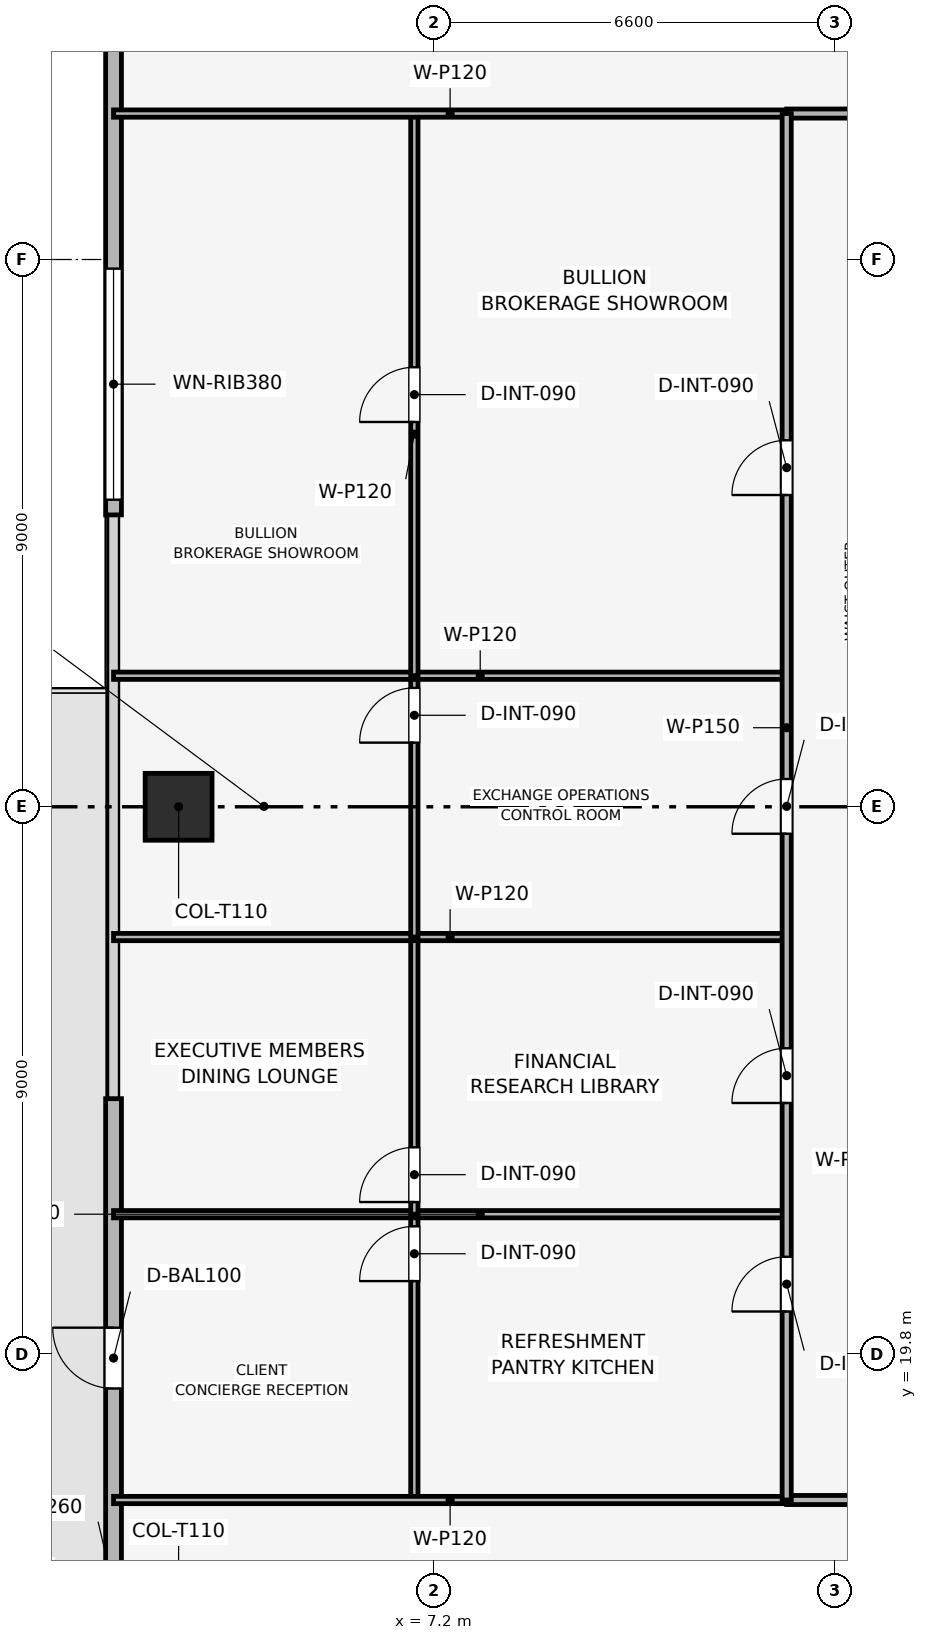
"""IFC4 building model, lengths in metres.
Left out: names, types, materials, properties, quantities, classifications, styles, units other than length and angle.
Written with IfcOpenShell. Run it as: python <this file> out.ifc"""

import sys

from ifc_helpers import new_model, si_unit, direction, frame, frame_2d, origin, origin_2d, place, context, subcontext, project, spatial, rectangle, extrude, element, fill, save


model = new_model("IFC4")
c1 = context("Model", 3, precision=1e-05, world=origin(), true_north=direction((0.0, 1.0)))
c2 = subcontext(c1, "Body", "Model", "MODEL_VIEW")
j1 = project(units=[si_unit("LENGTHUNIT", "METRE"), si_unit("PLANEANGLEUNIT", "RADIAN")], contexts=[c1])
p1 = place(None, origin())
s1 = spatial("IfcSite", under=j1, at=p1, CompositionType="ELEMENT")
p2 = place(p1, origin())
s2 = spatial("IfcBuilding", under=s1, at=p2, CompositionType="ELEMENT")
p3 = place(p2, frame((0.0, 0.0, 214.95)))
s3 = spatial("IfcBuildingStorey", under=s2, at=p3, CompositionType="ELEMENT", Elevation=214.95)
p4 = place(p3, frame((3.0, 28.8, 0.003), z_axis=(0.0, 0.0, 1.0), x_axis=(1.0, 0.0, 0.0)))
e1 = element("IfcColumn", 1, at=p4, inside=s3, PredefinedType="COLUMN", context=c2, shape_type="SweptSolid", body=[
    extrude(rectangle(XDim=1.1, YDim=1.1, at=origin_2d()), origin(), (0.0, 0.0, 1.0), 3.494),
])
p5 = place(p3, frame((1.93, 9.3, 0.0), z_axis=(0.0, 0.0, 1.0), x_axis=(0.0, 1.0, 0.0)))
e2 = element("IfcWall", 2, at=p5, inside=s3, PredefinedType="SOLIDWALL", context=c2, shape_type="SweptSolid", body=[
    extrude(rectangle(XDim=14.7, YDim=0.26, at=frame_2d((7.35, 0.0))), origin(), (0.0, 0.0, 1.0), 3.5),
])
p6 = place(p5, frame((9.934, 0.0, 0.0)))
e3 = element("IfcOpeningElement", 3, at=p6, cuts=e2, PredefinedType="OPENING", context=c2, shape_type="SweptSolid", body=[
    extrude(rectangle(XDim=1.0, YDim=2.2, at=frame_2d((0.5, 1.1))), frame((0.0, 0.14, 0.0), z_axis=(0.0, -1.0, 0.0), x_axis=(1.0, 0.0, 0.0)), (0.0, 0.0, 1.0), 0.28),
])
p7 = place(p3, frame((1.93, 33.6, 0.0), z_axis=(0.0, 0.0, 1.0), x_axis=(0.0, 1.0, 0.0)))
e4 = element("IfcWall", 4, at=p7, inside=s3, PredefinedType="SOLIDWALL", context=c2, shape_type="SweptSolid", body=[
    extrude(rectangle(XDim=14.7, YDim=0.26, at=frame_2d((7.35, 0.0))), origin(), (0.0, 0.0, 1.0), 3.5),
])
p8 = place(p7, frame((0.25, 0.0, 0.9)))
e5 = element("IfcOpeningElement", 5, at=p8, cuts=e4, PredefinedType="OPENING", context=c2, shape_type="SweptSolid", body=[
    extrude(rectangle(XDim=3.8, YDim=1.9, at=frame_2d((1.9, 0.95))), frame((0.0, 0.14, 0.0), z_axis=(0.0, -1.0, 0.0), x_axis=(1.0, 0.0, 0.0)), (0.0, 0.0, 1.0), 0.28),
])
p9 = place(p3, frame((6.877, 17.4, 0.0), z_axis=(0.0, 0.0, 1.0), x_axis=(0.0, 1.0, 0.0)))
e6 = element("IfcWall", 6, at=p9, inside=s3, PredefinedType="PARTITIONING", context=c2, shape_type="SweptSolid", body=[
    extrude(rectangle(XDim=4.7, YDim=0.12, at=frame_2d((2.35, 0.0))), origin(), (0.0, 0.0, 1.0), 3.035),
])
p10 = place(p9, frame((3.6, 0.0, 0.0)))
e7 = element("IfcOpeningElement", 7, at=p10, cuts=e6, PredefinedType="OPENING", context=c2, shape_type="SweptSolid", body=[
    extrude(rectangle(XDim=0.9, YDim=2.1, at=frame_2d((0.45, 1.05))), frame((0.0, 0.07, 0.0), z_axis=(0.0, -1.0, 0.0), x_axis=(1.0, 0.0, 0.0)), (0.0, 0.0, 1.0), 0.14),
])
p11 = place(p3, frame((1.93, 22.1, 0.0), z_axis=(0.0, 0.0, 1.0), x_axis=(1.0, 0.0, 0.0)))
e8 = element("IfcWall", 8, at=p11, inside=s3, PredefinedType="PARTITIONING", context=c2, shape_type="SweptSolid", body=[
    extrude(rectangle(XDim=11.07, YDim=0.12, at=frame_2d((5.535, 0.0))), origin(), (0.0, 0.0, 1.0), 2.885),
])
p12 = place(p3, frame((6.877, 22.1, 0.0), z_axis=(0.0, 0.0, 1.0), x_axis=(0.0, 1.0, 0.0)))
e9 = element("IfcWall", 9, at=p12, inside=s3, PredefinedType="PARTITIONING", context=c2, shape_type="SweptSolid", body=[
    extrude(rectangle(XDim=4.558, YDim=0.12, at=frame_2d((2.279, 0.0))), origin(), (0.0, 0.0, 1.0), 3.5),
])
p13 = place(p12, frame((0.2, 0.0, 0.0)))
e10 = element("IfcOpeningElement", 10, at=p13, cuts=e9, PredefinedType="OPENING", context=c2, shape_type="SweptSolid", body=[
    extrude(rectangle(XDim=0.9, YDim=2.1, at=frame_2d((0.45, 1.05))), frame((0.0, 0.07, 0.0), z_axis=(0.0, -1.0, 0.0), x_axis=(1.0, 0.0, 0.0)), (0.0, 0.0, 1.0), 0.14),
])
p14 = place(p3, frame((1.93, 26.658, 0.0), z_axis=(0.0, 0.0, 1.0), x_axis=(1.0, 0.0, 0.0)))
e11 = element("IfcWall", 11, at=p14, inside=s3, PredefinedType="PARTITIONING", context=c2, shape_type="SweptSolid", body=[
    extrude(rectangle(XDim=11.07, YDim=0.12, at=frame_2d((5.535, 0.0))), origin(), (0.0, 0.0, 1.0), 2.885),
])
p15 = place(p3, frame((6.877, 26.658, 0.0), z_axis=(0.0, 0.0, 1.0), x_axis=(0.0, 1.0, 0.0)))
e12 = element("IfcWall", 12, at=p15, inside=s3, PredefinedType="PARTITIONING", context=c2, shape_type="SweptSolid", body=[
    extrude(rectangle(XDim=4.297, YDim=0.12, at=frame_2d((2.148, 0.0))), origin(), (0.0, 0.0, 1.0), 3.035),
])
p16 = place(p15, frame((3.197, 0.0, 0.0)))
e13 = element("IfcOpeningElement", 13, at=p16, cuts=e12, PredefinedType="OPENING", context=c2, shape_type="SweptSolid", body=[
    extrude(rectangle(XDim=0.9, YDim=2.1, at=frame_2d((0.45, 1.05))), frame((0.0, 0.07, 0.0), z_axis=(0.0, -1.0, 0.0), x_axis=(1.0, 0.0, 0.0)), (0.0, 0.0, 1.0), 0.14),
])
p17 = place(p3, frame((1.93, 30.955, 0.0), z_axis=(0.0, 0.0, 1.0), x_axis=(1.0, 0.0, 0.0)))
e14 = element("IfcWall", 14, at=p17, inside=s3, PredefinedType="PARTITIONING", context=c2, shape_type="SweptSolid", body=[
    extrude(rectangle(XDim=11.07, YDim=0.12, at=frame_2d((5.535, 0.0))), origin(), (0.0, 0.0, 1.0), 2.885),
])
p18 = place(p3, frame((6.877, 30.955, 0.0), z_axis=(0.0, 0.0, 1.0), x_axis=(0.0, 1.0, 0.0)))
e15 = element("IfcWall", 15, at=p18, inside=s3, PredefinedType="PARTITIONING", context=c2, shape_type="SweptSolid", body=[
    extrude(rectangle(XDim=9.245, YDim=0.12, at=frame_2d((4.623, 0.0))), origin(), (0.0, 0.0, 1.0), 3.035),
])
p19 = place(p18, frame((4.173, 0.0, 0.0)))
e16 = element("IfcOpeningElement", 16, at=p19, cuts=e15, PredefinedType="OPENING", context=c2, shape_type="SweptSolid", body=[
    extrude(rectangle(XDim=0.9, YDim=2.1, at=frame_2d((0.45, 1.05))), frame((0.0, 0.07, 0.0), z_axis=(0.0, -1.0, 0.0), x_axis=(1.0, 0.0, 0.0)), (0.0, 0.0, 1.0), 0.14),
])
for number, where, z_axis, x_axis in (
    (17, (1.93, 17.4, 0.0), (0.0, 0.0, 1.0), (1.0, 0.0, 0.0)),
    (18, (1.93, 40.2, 0.0), (0.0, 0.0, 1.0), (1.0, 0.0, 0.0)),
):
    element("IfcWall", number, at=place(p3, frame(where, z_axis=z_axis, x_axis=x_axis)), inside=s3, PredefinedType="PARTITIONING", context=c2, shape_type="SweptSolid", body=[
        extrude(rectangle(XDim=11.07, YDim=0.12, at=frame_2d((5.535, 0.0))), origin(), (0.0, 0.0, 1.0), 2.885),
    ])
p20 = place(p3, frame((13.0, 17.4, 0.0), z_axis=(0.0, 0.0, 1.0), x_axis=(1.0, 0.0, 0.0)))
e19 = element("IfcWall", 19, at=p20, inside=s3, PredefinedType="PARTITIONING", context=c2, shape_type="SweptSolid", body=[
    extrude(rectangle(XDim=31.6, YDim=0.15, at=frame_2d((15.8, 0.0))), origin(), (0.0, 0.0, 1.0), 3.035),
])
p21 = place(p20, frame((3.805, 0.0, 0.0)))
e20 = element("IfcOpeningElement", 20, at=p21, cuts=e19, PredefinedType="OPENING", context=c2, shape_type="SweptSolid", body=[
    extrude(rectangle(XDim=0.9, YDim=2.1, at=frame_2d((0.45, 1.05))), frame((0.0, 0.085, 0.0), z_axis=(0.0, -1.0, 0.0), x_axis=(1.0, 0.0, 0.0)), (0.0, 0.0, 1.0), 0.17),
])
p22 = place(p20, frame((19.605, 0.0, 0.0)))
e21 = element("IfcOpeningElement", 21, at=p22, cuts=e19, PredefinedType="OPENING", context=c2, shape_type="SweptSolid", body=[
    extrude(rectangle(XDim=0.9, YDim=2.1, at=frame_2d((0.45, 1.05))), frame((0.0, 0.085, 0.0), z_axis=(0.0, -1.0, 0.0), x_axis=(1.0, 0.0, 0.0)), (0.0, 0.0, 1.0), 0.17),
])
p23 = place(p3, frame((13.0, 40.2, 0.0), z_axis=(0.0, 0.0, 1.0), x_axis=(1.0, 0.0, 0.0)))
e22 = element("IfcWall", 22, at=p23, inside=s3, PredefinedType="PARTITIONING", context=c2, shape_type="SweptSolid", body=[
    extrude(rectangle(XDim=31.6, YDim=0.15, at=frame_2d((15.8, 0.0))), origin(), (0.0, 0.0, 1.0), 3.035),
])
p24 = place(p23, frame((15.35, 0.0, 0.0)))
e23 = element("IfcOpeningElement", 23, at=p24, cuts=e22, PredefinedType="OPENING", context=c2, shape_type="SweptSolid", body=[
    extrude(rectangle(XDim=0.9, YDim=2.1, at=frame_2d((0.45, 1.05))), frame((0.0, 0.085, 0.0), z_axis=(0.0, -1.0, 0.0), x_axis=(1.0, 0.0, 0.0)), (0.0, 0.0, 1.0), 0.17),
])
p25 = place(p3, frame((13.0, 17.4, 0.0), z_axis=(0.0, 0.0, 1.0), x_axis=(0.0, 1.0, 0.0)))
e24 = element("IfcWall", 24, at=p25, inside=s3, PredefinedType="PARTITIONING", context=c2, shape_type="SweptSolid", body=[
    extrude(rectangle(XDim=22.8, YDim=0.15, at=frame_2d((11.4, 0.0))), origin(), (0.0, 0.0, 1.0), 3.035),
])
p26 = place(p25, frame((3.1, 0.0, 0.0)))
e25 = element("IfcOpeningElement", 25, at=p26, cuts=e24, PredefinedType="OPENING", context=c2, shape_type="SweptSolid", body=[
    extrude(rectangle(XDim=0.9, YDim=2.1, at=frame_2d((0.45, 1.05))), frame((0.0, 0.085, 0.0), z_axis=(0.0, -1.0, 0.0), x_axis=(1.0, 0.0, 0.0)), (0.0, 0.0, 1.0), 0.17),
])
p27 = place(p25, frame((6.529, 0.0, 0.0)))
e26 = element("IfcOpeningElement", 26, at=p27, cuts=e24, PredefinedType="OPENING", context=c2, shape_type="SweptSolid", body=[
    extrude(rectangle(XDim=0.9, YDim=2.1, at=frame_2d((0.45, 1.05))), frame((0.0, 0.085, 0.0), z_axis=(0.0, -1.0, 0.0), x_axis=(1.0, 0.0, 0.0)), (0.0, 0.0, 1.0), 0.17),
])
p28 = place(p25, frame((10.957, 0.0, 0.0)))
e27 = element("IfcOpeningElement", 27, at=p28, cuts=e24, PredefinedType="OPENING", context=c2, shape_type="SweptSolid", body=[
    extrude(rectangle(XDim=0.9, YDim=2.1, at=frame_2d((0.45, 1.05))), frame((0.0, 0.085, 0.0), z_axis=(0.0, -1.0, 0.0), x_axis=(1.0, 0.0, 0.0)), (0.0, 0.0, 1.0), 0.17),
])
p29 = place(p25, frame((16.527, 0.0, 0.0)))
e28 = element("IfcOpeningElement", 28, at=p29, cuts=e24, PredefinedType="OPENING", context=c2, shape_type="SweptSolid", body=[
    extrude(rectangle(XDim=0.9, YDim=2.1, at=frame_2d((0.45, 1.05))), frame((0.0, 0.085, 0.0), z_axis=(0.0, -1.0, 0.0), x_axis=(1.0, 0.0, 0.0)), (0.0, 0.0, 1.0), 0.17),
])
p30 = place(p6, origin())
e29 = element("IfcDoor", 29, at=p30, inside=s3, OperationType="SINGLE_SWING_RIGHT", PredefinedType="DOOR", context=c2, shape_type="SweptSolid", body=[
    extrude(rectangle(XDim=1.0, YDim=2.2, at=frame_2d((0.5, 1.1))), frame((0.0, 0.025, 0.0), z_axis=(0.0, -1.0, 0.0), x_axis=(1.0, 0.0, 0.0)), (0.0, 0.0, 1.0), 0.05),
])
fill(e3, e29)
p31 = place(p8, origin())
e30 = element("IfcWindow", 30, at=p31, inside=s3, PartitioningType="SINGLE_PANEL", PredefinedType="WINDOW", context=c2, shape_type="SweptSolid", body=[
    extrude(rectangle(XDim=3.8, YDim=1.9, at=frame_2d((1.9, 0.95))), frame((0.0, 0.03, 0.0), z_axis=(0.0, -1.0, 0.0), x_axis=(1.0, 0.0, 0.0)), (0.0, 0.0, 1.0), 0.06),
])
fill(e5, e30)
p32 = place(p10, origin())
e31 = element("IfcDoor", 31, at=p32, inside=s3, OperationType="SINGLE_SWING_LEFT", PredefinedType="DOOR", context=c2, shape_type="SweptSolid", body=[
    extrude(rectangle(XDim=0.9, YDim=2.1, at=frame_2d((0.45, 1.05))), frame((0.0, 0.025, 0.0), z_axis=(0.0, -1.0, 0.0), x_axis=(1.0, 0.0, 0.0)), (0.0, 0.0, 1.0), 0.05),
])
fill(e7, e31)
p33 = place(p13, origin())
e32 = element("IfcDoor", 32, at=p33, inside=s3, OperationType="SINGLE_SWING_LEFT", PredefinedType="DOOR", context=c2, shape_type="SweptSolid", body=[
    extrude(rectangle(XDim=0.9, YDim=2.1, at=frame_2d((0.45, 1.05))), frame((0.0, 0.025, 0.0), z_axis=(0.0, -1.0, 0.0), x_axis=(1.0, 0.0, 0.0)), (0.0, 0.0, 1.0), 0.05),
])
fill(e10, e32)
p34 = place(p16, origin())
e33 = element("IfcDoor", 33, at=p34, inside=s3, OperationType="SINGLE_SWING_LEFT", PredefinedType="DOOR", context=c2, shape_type="SweptSolid", body=[
    extrude(rectangle(XDim=0.9, YDim=2.1, at=frame_2d((0.45, 1.05))), frame((0.0, 0.025, 0.0), z_axis=(0.0, -1.0, 0.0), x_axis=(1.0, 0.0, 0.0)), (0.0, 0.0, 1.0), 0.05),
])
fill(e13, e33)
p35 = place(p19, origin())
e34 = element("IfcDoor", 34, at=p35, inside=s3, OperationType="SINGLE_SWING_LEFT", PredefinedType="DOOR", context=c2, shape_type="SweptSolid", body=[
    extrude(rectangle(XDim=0.9, YDim=2.1, at=frame_2d((0.45, 1.05))), frame((0.0, 0.025, 0.0), z_axis=(0.0, -1.0, 0.0), x_axis=(1.0, 0.0, 0.0)), (0.0, 0.0, 1.0), 0.05),
])
fill(e16, e34)
p36 = place(p26, origin())
e35 = element("IfcDoor", 35, at=p36, inside=s3, OperationType="SINGLE_SWING_LEFT", PredefinedType="DOOR", context=c2, shape_type="SweptSolid", body=[
    extrude(rectangle(XDim=0.9, YDim=2.1, at=frame_2d((0.45, 1.05))), frame((0.0, 0.025, 0.0), z_axis=(0.0, -1.0, 0.0), x_axis=(1.0, 0.0, 0.0)), (0.0, 0.0, 1.0), 0.05),
])
fill(e25, e35)
p37 = place(p27, origin())
e36 = element("IfcDoor", 36, at=p37, inside=s3, OperationType="SINGLE_SWING_LEFT", PredefinedType="DOOR", context=c2, shape_type="SweptSolid", body=[
    extrude(rectangle(XDim=0.9, YDim=2.1, at=frame_2d((0.45, 1.05))), frame((0.0, 0.025, 0.0), z_axis=(0.0, -1.0, 0.0), x_axis=(1.0, 0.0, 0.0)), (0.0, 0.0, 1.0), 0.05),
])
fill(e26, e36)
p38 = place(p28, origin())
e37 = element("IfcDoor", 37, at=p38, inside=s3, OperationType="SINGLE_SWING_LEFT", PredefinedType="DOOR", context=c2, shape_type="SweptSolid", body=[
    extrude(rectangle(XDim=0.9, YDim=2.1, at=frame_2d((0.45, 1.05))), frame((0.0, 0.025, 0.0), z_axis=(0.0, -1.0, 0.0), x_axis=(1.0, 0.0, 0.0)), (0.0, 0.0, 1.0), 0.05),
])
fill(e27, e37)
p39 = place(p29, origin())
e38 = element("IfcDoor", 38, at=p39, inside=s3, OperationType="SINGLE_SWING_LEFT", PredefinedType="DOOR", context=c2, shape_type="SweptSolid", body=[
    extrude(rectangle(XDim=0.9, YDim=2.1, at=frame_2d((0.45, 1.05))), frame((0.0, 0.025, 0.0), z_axis=(0.0, -1.0, 0.0), x_axis=(1.0, 0.0, 0.0)), (0.0, 0.0, 1.0), 0.05),
])
fill(e28, e38)
save(model, sys.argv[1])
